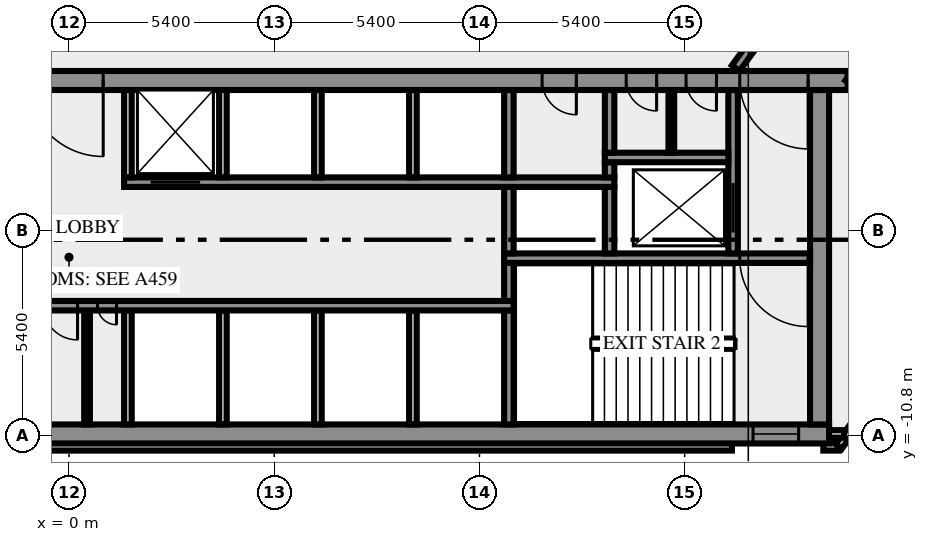
"""IFC4 building model, lengths in metres.
Left out: names, types, materials, properties, quantities, classifications, styles, units other than length and angle.
Written with IfcOpenShell. Run it as: python <this file> out.ifc"""

import sys

from ifc_helpers import new_model, si_unit, direction, frame, frame_2d, origin, place, context, subcontext, project, spatial, rectangle, extrude, element, fill, save


model = new_model("IFC4")
c1 = context("Model", 3, precision=1e-05, world=origin(), true_north=direction((0.0, 1.0)))
c2 = subcontext(c1, "Body", "Model", "MODEL_VIEW")
j1 = project(units=[si_unit("LENGTHUNIT", "METRE"), si_unit("PLANEANGLEUNIT", "RADIAN")], contexts=[c1])
p1 = place(None, origin())
s1 = spatial("IfcSite", under=j1, at=p1, CompositionType="ELEMENT")
p2 = place(p1, origin())
s2 = spatial("IfcBuilding", under=s1, at=p2, CompositionType="ELEMENT")
p3 = place(p2, frame((0.0, 0.0, 63.0)))
s3 = spatial("IfcBuildingStorey", under=s2, at=p3, CompositionType="ELEMENT", Elevation=63.0)
p4 = place(p3, frame((-17.444, -11.088, 0.0), z_axis=(0.0, 0.0, 1.0), x_axis=(1.0, 0.0, 0.0)))
e1 = element("IfcWall", 1, at=p4, inside=s3, PredefinedType="SOLIDWALL", context=c2, shape_type="SweptSolid", body=[
    extrude(rectangle(XDim=34.888, YDim=0.2, at=frame_2d((17.444, 0.0))), origin(), (0.0, 0.0, 1.0), 3.65),
])
p5 = place(p3, frame((19.85, -11.088, 0.0), z_axis=(0.0, 0.0, 1.0), x_axis=(1.0, 0.0, 0.0)))
e2 = element("IfcWall", 2, at=p5, inside=s3, PredefinedType="SOLIDWALL", context=c2, shape_type="SweptSolid", body=[
    extrude(rectangle(XDim=0.406, YDim=0.2, at=frame_2d((0.203, 0.0))), origin(), (0.0, 0.0, 1.0), 3.65),
])
p6 = place(p3, frame((20.253, -11.083, 0.0), z_axis=(0.0, 0.0, 1.0), x_axis=(0.587766567315, 0.809030569476, 0.0)))
e3 = element("IfcWall", 3, at=p6, inside=s3, PredefinedType="SOLIDWALL", context=c2, shape_type="SweptSolid", body=[
    extrude(rectangle(XDim=2.688, YDim=0.2, at=frame_2d((1.344, 0.0))), origin(), (0.0, 0.0, 1.0), 3.65),
])
p7 = place(p3, frame((19.98, -10.75, 0.0), z_axis=(0.0, 0.0, 1.0), x_axis=(1.0, 0.0, 0.0)))
e4 = element("IfcWall", 4, at=p7, inside=s3, PredefinedType="SOLIDWALL", context=c2, shape_type="SweptSolid", body=[
    extrude(rectangle(XDim=0.417, YDim=0.2, at=frame_2d((0.208, 0.0))), origin(), (0.0, 0.0, 1.0), 3.65),
])
p8 = place(p3, frame((-20.0, -10.75, 0.0), z_axis=(0.0, 0.0, 1.0), x_axis=(1.0, 0.0, 0.0)))
e5 = element("IfcWall", 5, at=p8, inside=s3, PredefinedType="SHEAR", context=c2, shape_type="SweptSolid", body=[
    extrude(rectangle(XDim=40.0, YDim=0.5, at=frame_2d((20.0, 0.0))), origin(), (0.0, 0.0, 1.0), 3.65),
])
p9 = place(p8, frame((0.8, 0.0, 1.0)))
e6 = element("IfcOpeningElement", 6, at=p9, cuts=e5, PredefinedType="OPENING", context=c2, shape_type="SweptSolid", body=[
    extrude(rectangle(XDim=1.2, YDim=1.2, at=frame_2d((0.6, 0.6))), frame((0.0, 0.26, 0.0), z_axis=(0.0, -1.0, 0.0), x_axis=(1.0, 0.0, 0.0)), (0.0, 0.0, 1.0), 0.52),
])
p10 = place(p8, frame((38.0, 0.0, 1.0)))
e7 = element("IfcOpeningElement", 7, at=p10, cuts=e5, PredefinedType="OPENING", context=c2, shape_type="SweptSolid", body=[
    extrude(rectangle(XDim=1.2, YDim=1.2, at=frame_2d((0.6, 0.6))), frame((0.0, 0.26, 0.0), z_axis=(0.0, -1.0, 0.0), x_axis=(1.0, 0.0, 0.0)), (0.0, 0.0, 1.0), 0.52),
])
p11 = place(p3, frame((0.475, -10.5, 0.0), z_axis=(0.0, 0.0, 1.0), x_axis=(0.0, 1.0, 0.0)))
e8 = element("IfcWall", 8, at=p11, inside=s3, PredefinedType="PARTITIONING", context=c2, shape_type="SweptSolid", body=[
    extrude(rectangle(XDim=3.0, YDim=0.15, at=frame_2d((1.5, 0.0))), origin(), (0.0, 0.0, 1.0), 3.65),
])
for number, where, z_axis, x_axis in (
    (9, (1.55, -10.5, 0.0), (0.0, 0.0, 1.0), (0.0, 1.0, 0.0)),
    (10, (4.05, -10.5, 0.0), (0.0, 0.0, 1.0), (0.0, 1.0, 0.0)),
    (11, (6.55, -10.5, 0.0), (0.0, 0.0, 1.0), (0.0, 1.0, 0.0)),
    (12, (9.05, -10.5, 0.0), (0.0, 0.0, 1.0), (0.0, 1.0, 0.0)),
):
    element("IfcWall", number, at=place(p3, frame(where, z_axis=z_axis, x_axis=x_axis)), inside=s3, PredefinedType="SOLIDWALL", context=c2, shape_type="SweptSolid", body=[
        extrude(rectangle(XDim=3.0, YDim=0.2, at=frame_2d((1.5, 0.0))), origin(), (0.0, 0.0, 1.0), 3.65),
    ])
p12 = place(p3, frame((11.575, -10.5, 0.0), z_axis=(0.0, 0.0, 1.0), x_axis=(0.0, 1.0, 0.0)))
e13 = element("IfcWall", 13, at=p12, inside=s3, PredefinedType="SHEAR", context=c2, shape_type="SweptSolid", body=[
    extrude(rectangle(XDim=3.0, YDim=0.25, at=frame_2d((1.5, 0.0))), origin(), (0.0, 0.0, 1.0), 3.65),
])
p13 = place(p3, frame((19.75, -10.5, 0.0), z_axis=(0.0, 0.0, 1.0), x_axis=(0.0, 1.0, 0.0)))
e14 = element("IfcWall", 14, at=p13, inside=s3, PredefinedType="SHEAR", context=c2, shape_type="SweptSolid", body=[
    extrude(rectangle(XDim=8.8, YDim=0.5, at=frame_2d((4.4, 0.0))), origin(), (0.0, 0.0, 1.0), 3.65),
])
p14 = place(p3, frame((11.7, -7.375, 0.0), z_axis=(0.0, 0.0, 1.0), x_axis=(-1.0, 0.0, 0.0)))
e15 = element("IfcWall", 15, at=p14, inside=s3, PredefinedType="SHEAR", context=c2, shape_type="SweptSolid", body=[
    extrude(rectangle(XDim=23.4, YDim=0.25, at=frame_2d((11.7, 0.0))), origin(), (0.0, 0.0, 1.0), 3.65),
])
p15 = place(p14, frame((21.45, 0.0, 0.0)))
e16 = element("IfcOpeningElement", 16, at=p15, cuts=e15, PredefinedType="OPENING", context=c2, shape_type="SweptSolid", body=[
    extrude(rectangle(XDim=1.1, YDim=2.1, at=frame_2d((0.55, 1.05))), frame((0.0, 0.135, 0.0), z_axis=(0.0, -1.0, 0.0), x_axis=(1.0, 0.0, 0.0)), (0.0, 0.0, 1.0), 0.27),
])
p16 = place(p14, frame((18.95, 0.0, 0.0)))
e17 = element("IfcOpeningElement", 17, at=p16, cuts=e15, PredefinedType="OPENING", context=c2, shape_type="SweptSolid", body=[
    extrude(rectangle(XDim=1.1, YDim=2.1, at=frame_2d((0.55, 1.05))), frame((0.0, 0.135, 0.0), z_axis=(0.0, -1.0, 0.0), x_axis=(1.0, 0.0, 0.0)), (0.0, 0.0, 1.0), 0.27),
])
p17 = place(p14, frame((16.45, 0.0, 0.0)))
e18 = element("IfcOpeningElement", 18, at=p17, cuts=e15, PredefinedType="OPENING", context=c2, shape_type="SweptSolid", body=[
    extrude(rectangle(XDim=1.1, YDim=2.1, at=frame_2d((0.55, 1.05))), frame((0.0, 0.135, 0.0), z_axis=(0.0, -1.0, 0.0), x_axis=(1.0, 0.0, 0.0)), (0.0, 0.0, 1.0), 0.27),
])
p18 = place(p14, frame((14.5, 0.0, 0.0)))
e19 = element("IfcOpeningElement", 19, at=p18, cuts=e15, PredefinedType="OPENING", context=c2, shape_type="SweptSolid", body=[
    extrude(rectangle(XDim=0.9, YDim=2.1, at=frame_2d((0.45, 1.05))), frame((0.0, 0.135, 0.0), z_axis=(0.0, -1.0, 0.0), x_axis=(1.0, 0.0, 0.0)), (0.0, 0.0, 1.0), 0.27),
])
p19 = place(p14, frame((12.95, 0.0, 0.0)))
e20 = element("IfcOpeningElement", 20, at=p19, cuts=e15, PredefinedType="OPENING", context=c2, shape_type="SweptSolid", body=[
    extrude(rectangle(XDim=0.9, YDim=2.1, at=frame_2d((0.45, 1.05))), frame((0.0, 0.135, 0.0), z_axis=(0.0, -1.0, 0.0), x_axis=(1.0, 0.0, 0.0)), (0.0, 0.0, 1.0), 0.27),
])
p20 = place(p14, frame((11.475, 0.0, 0.0)))
e21 = element("IfcOpeningElement", 21, at=p20, cuts=e15, PredefinedType="OPENING", context=c2, shape_type="SweptSolid", body=[
    extrude(rectangle(XDim=0.9, YDim=2.1, at=frame_2d((0.45, 1.05))), frame((0.0, 0.135, 0.0), z_axis=(0.0, -1.0, 0.0), x_axis=(1.0, 0.0, 0.0)), (0.0, 0.0, 1.0), 0.27),
])
p21 = place(p14, frame((10.45, 0.0, 0.0)))
e22 = element("IfcOpeningElement", 22, at=p21, cuts=e15, PredefinedType="OPENING", context=c2, shape_type="SweptSolid", body=[
    extrude(rectangle(XDim=0.5, YDim=2.1, at=frame_2d((0.25, 1.05))), frame((0.0, 0.135, 0.0), z_axis=(0.0, -1.0, 0.0), x_axis=(1.0, 0.0, 0.0)), (0.0, 0.0, 1.0), 0.27),
])
p22 = place(p3, frame((11.575, -7.25, 0.0), z_axis=(0.0, 0.0, 1.0), x_axis=(0.0, 1.0, 0.0)))
e23 = element("IfcWall", 23, at=p22, inside=s3, PredefinedType="SHEAR", context=c2, shape_type="SweptSolid", body=[
    extrude(rectangle(XDim=1.0, YDim=0.25, at=frame_2d((0.5, 0.0))), origin(), (0.0, 0.0, 1.0), 3.65),
])
p23 = place(p3, frame((19.5, -6.125, 0.0), z_axis=(0.0, 0.0, 1.0), x_axis=(-1.0, 0.0, 0.0)))
e24 = element("IfcWall", 24, at=p23, inside=s3, PredefinedType="SHEAR", context=c2, shape_type="SweptSolid", body=[
    extrude(rectangle(XDim=8.05, YDim=0.25, at=frame_2d((4.025, 0.0))), origin(), (0.0, 0.0, 1.0), 3.65),
])
p24 = place(p23, frame((0.05, 0.0, 0.0)))
e25 = element("IfcOpeningElement", 25, at=p24, cuts=e24, PredefinedType="OPENING", context=c2, shape_type="SweptSolid", body=[
    extrude(rectangle(XDim=1.8, YDim=2.1, at=frame_2d((0.9, 1.05))), frame((0.0, 0.135, 0.0), z_axis=(0.0, -1.0, 0.0), x_axis=(1.0, 0.0, 0.0)), (0.0, 0.0, 1.0), 0.27),
])
for number, where, z_axis, x_axis in (
    (26, (11.575, -6.0, 0.0), (0.0, 0.0, 1.0), (0.0, 1.0, 0.0)),
    (27, (14.225, -6.0, 0.0), (0.0, 0.0, 1.0), (0.0, 1.0, 0.0)),
):
    element("IfcWall", number, at=place(p3, frame(where, z_axis=z_axis, x_axis=x_axis)), inside=s3, PredefinedType="SHEAR", context=c2, shape_type="SweptSolid", body=[
        extrude(rectangle(XDim=1.75, YDim=0.25, at=frame_2d((0.875, 0.0))), origin(), (0.0, 0.0, 1.0), 3.65),
    ])
p25 = place(p3, frame((17.475, -6.0, 0.0), z_axis=(0.0, 0.0, 1.0), x_axis=(0.0, 1.0, 0.0)))
e28 = element("IfcWall", 28, at=p25, inside=s3, PredefinedType="SHEAR", context=c2, shape_type="SweptSolid", body=[
    extrude(rectangle(XDim=4.3, YDim=0.25, at=frame_2d((2.15, 0.0))), origin(), (0.0, 0.0, 1.0), 3.65),
])
p26 = place(p25, frame((0.55, 0.0, 0.0)))
e29 = element("IfcOpeningElement", 29, at=p26, cuts=e28, PredefinedType="OPENING", context=c2, shape_type="SweptSolid", body=[
    extrude(rectangle(XDim=1.3, YDim=2.1, at=frame_2d((0.65, 1.05))), frame((0.0, 0.135, 0.0), z_axis=(0.0, -1.0, 0.0), x_axis=(1.0, 0.0, 0.0)), (0.0, 0.0, 1.0), 0.27),
])
p27 = place(p3, frame((1.45, -4.125, 0.0), z_axis=(0.0, 0.0, 1.0), x_axis=(1.0, 0.0, 0.0)))
e30 = element("IfcWall", 30, at=p27, inside=s3, PredefinedType="SHEAR", context=c2, shape_type="SweptSolid", body=[
    extrude(rectangle(XDim=12.9, YDim=0.25, at=frame_2d((6.45, 0.0))), origin(), (0.0, 0.0, 1.0), 3.65),
])
p28 = place(p27, frame((0.7, 0.0, 0.0)))
e31 = element("IfcOpeningElement", 31, at=p28, cuts=e30, PredefinedType="OPENING", context=c2, shape_type="SweptSolid", body=[
    extrude(rectangle(XDim=1.3, YDim=2.1, at=frame_2d((0.65, 1.05))), frame((0.0, 0.135, 0.0), z_axis=(0.0, -1.0, 0.0), x_axis=(1.0, 0.0, 0.0)), (0.0, 0.0, 1.0), 0.27),
])
for number, where, z_axis, x_axis in (
    (32, (1.55, -4.0, 0.0), (0.0, 0.0, 1.0), (0.0, 1.0, 0.0)),
    (33, (4.05, -4.0, 0.0), (0.0, 0.0, 1.0), (0.0, 1.0, 0.0)),
    (34, (6.55, -4.0, 0.0), (0.0, 0.0, 1.0), (0.0, 1.0, 0.0)),
    (35, (9.05, -4.0, 0.0), (0.0, 0.0, 1.0), (0.0, 1.0, 0.0)),
):
    element("IfcWall", number, at=place(p3, frame(where, z_axis=z_axis, x_axis=x_axis)), inside=s3, PredefinedType="SOLIDWALL", context=c2, shape_type="SweptSolid", body=[
        extrude(rectangle(XDim=2.3, YDim=0.2, at=frame_2d((1.15, 0.0))), origin(), (0.0, 0.0, 1.0), 3.65),
    ])
p29 = place(p3, frame((11.575, -4.0, 0.0), z_axis=(0.0, 0.0, 1.0), x_axis=(0.0, 1.0, 0.0)))
e36 = element("IfcWall", 36, at=p29, inside=s3, PredefinedType="SHEAR", context=c2, shape_type="SweptSolid", body=[
    extrude(rectangle(XDim=2.3, YDim=0.25, at=frame_2d((1.15, 0.0))), origin(), (0.0, 0.0, 1.0), 3.65),
])
p30 = place(p3, frame((14.225, -4.0, 0.0), z_axis=(0.0, 0.0, 1.0), x_axis=(0.0, 1.0, 0.0)))
e37 = element("IfcWall", 37, at=p30, inside=s3, PredefinedType="SHEAR", context=c2, shape_type="SweptSolid", body=[
    extrude(rectangle(XDim=0.4, YDim=0.25, at=frame_2d((0.2, 0.0))), origin(), (0.0, 0.0, 1.0), 3.65),
])
p31 = place(p3, frame((14.1, -3.475, 0.0), z_axis=(0.0, 0.0, 1.0), x_axis=(1.0, 0.0, 0.0)))
e38 = element("IfcWall", 38, at=p31, inside=s3, PredefinedType="SHEAR", context=c2, shape_type="SweptSolid", body=[
    extrude(rectangle(XDim=3.25, YDim=0.25, at=frame_2d((1.625, 0.0))), origin(), (0.0, 0.0, 1.0), 3.65),
])
p32 = place(p3, frame((14.225, -3.35, 0.0), z_axis=(0.0, 0.0, 1.0), x_axis=(0.0, 1.0, 0.0)))
e39 = element("IfcWall", 39, at=p32, inside=s3, PredefinedType="SHEAR", context=c2, shape_type="SweptSolid", body=[
    extrude(rectangle(XDim=1.65, YDim=0.25, at=frame_2d((0.825, 0.0))), origin(), (0.0, 0.0, 1.0), 3.65),
])
p33 = place(p3, frame((15.85, -3.35, 0.0), z_axis=(0.0, 0.0, 1.0), x_axis=(0.0, 1.0, 0.0)))
e40 = element("IfcWall", 40, at=p33, inside=s3, PredefinedType="PARTITIONING", context=c2, shape_type="SweptSolid", body=[
    extrude(rectangle(XDim=1.65, YDim=0.15, at=frame_2d((0.825, 0.0))), origin(), (0.0, 0.0, 1.0), 3.65),
])
p34 = place(p3, frame((20.49, -1.45, 0.0), z_axis=(0.0, 0.0, 1.0), x_axis=(-1.0, 0.0, 0.0)))
e41 = element("IfcWall", 41, at=p34, inside=s3, PredefinedType="SHEAR", context=c2, shape_type="SweptSolid", body=[
    extrude(rectangle(XDim=40.98, YDim=0.5, at=frame_2d((20.49, 0.0))), origin(), (0.0, 0.0, 1.0), 3.65),
])
p35 = place(p34, frame((38.14, 0.0, 0.0)))
e42 = element("IfcOpeningElement", 42, at=p35, cuts=e41, PredefinedType="OPENING", context=c2, shape_type="SweptSolid", body=[
    extrude(rectangle(XDim=1.8, YDim=2.1, at=frame_2d((0.9, 1.05))), frame((0.0, 0.26, 0.0), z_axis=(0.0, -1.0, 0.0), x_axis=(1.0, 0.0, 0.0)), (0.0, 0.0, 1.0), 0.52),
])
p36 = place(p34, frame((35.89, 0.0, 0.0)))
e43 = element("IfcOpeningElement", 43, at=p36, cuts=e41, PredefinedType="OPENING", context=c2, shape_type="SweptSolid", body=[
    extrude(rectangle(XDim=0.9, YDim=2.1, at=frame_2d((0.45, 1.05))), frame((0.0, 0.26, 0.0), z_axis=(0.0, -1.0, 0.0), x_axis=(1.0, 0.0, 0.0)), (0.0, 0.0, 1.0), 0.52),
])
p37 = place(p34, frame((32.94, 0.0, 0.0)))
e44 = element("IfcOpeningElement", 44, at=p37, cuts=e41, PredefinedType="OPENING", context=c2, shape_type="SweptSolid", body=[
    extrude(rectangle(XDim=0.9, YDim=2.1, at=frame_2d((0.45, 1.05))), frame((0.0, 0.26, 0.0), z_axis=(0.0, -1.0, 0.0), x_axis=(1.0, 0.0, 0.0)), (0.0, 0.0, 1.0), 0.52),
])
p38 = place(p34, frame((19.59, 0.0, 0.0)))
e45 = element("IfcOpeningElement", 45, at=p38, cuts=e41, PredefinedType="OPENING", context=c2, shape_type="SweptSolid", body=[
    extrude(rectangle(XDim=2.0, YDim=2.1, at=frame_2d((1.0, 1.05))), frame((0.0, 0.26, 0.0), z_axis=(0.0, -1.0, 0.0), x_axis=(1.0, 0.0, 0.0)), (0.0, 0.0, 1.0), 0.52),
])
p39 = place(p34, frame((7.14, 0.0, 0.0)))
e46 = element("IfcOpeningElement", 46, at=p39, cuts=e41, PredefinedType="OPENING", context=c2, shape_type="SweptSolid", body=[
    extrude(rectangle(XDim=0.9, YDim=2.1, at=frame_2d((0.45, 1.05))), frame((0.0, 0.26, 0.0), z_axis=(0.0, -1.0, 0.0), x_axis=(1.0, 0.0, 0.0)), (0.0, 0.0, 1.0), 0.52),
])
p40 = place(p34, frame((5.028, 0.0, 0.0)))
e47 = element("IfcOpeningElement", 47, at=p40, cuts=e41, PredefinedType="OPENING", context=c2, shape_type="SweptSolid", body=[
    extrude(rectangle(XDim=0.8, YDim=2.1, at=frame_2d((0.4, 1.05))), frame((0.0, 0.26, 0.0), z_axis=(0.0, -1.0, 0.0), x_axis=(1.0, 0.0, 0.0)), (0.0, 0.0, 1.0), 0.52),
])
p41 = place(p34, frame((3.452, 0.0, 0.0)))
e48 = element("IfcOpeningElement", 48, at=p41, cuts=e41, PredefinedType="OPENING", context=c2, shape_type="SweptSolid", body=[
    extrude(rectangle(XDim=0.8, YDim=2.1, at=frame_2d((0.4, 1.05))), frame((0.0, 0.26, 0.0), z_axis=(0.0, -1.0, 0.0), x_axis=(1.0, 0.0, 0.0)), (0.0, 0.0, 1.0), 0.52),
])
p42 = place(p34, frame((1.04, 0.0, 0.0)))
e49 = element("IfcOpeningElement", 49, at=p42, cuts=e41, PredefinedType="OPENING", context=c2, shape_type="SweptSolid", body=[
    extrude(rectangle(XDim=1.8, YDim=2.1, at=frame_2d((0.9, 1.05))), frame((0.0, 0.26, 0.0), z_axis=(0.0, -1.0, 0.0), x_axis=(1.0, 0.0, 0.0)), (0.0, 0.0, 1.0), 0.52),
])
p43 = place(p3, frame((17.545, -1.125, 0.0), z_axis=(0.0, 0.0, 1.0), x_axis=(0.587786323093, 0.809016216391, 0.0)))
e50 = element("IfcWall", 50, at=p43, inside=s3, PredefinedType="SOLIDWALL", context=c2, shape_type="SweptSolid", body=[
    extrude(rectangle(XDim=33.493, YDim=0.25, at=frame_2d((16.747, 0.0))), origin(), (0.0, 0.0, 1.0), 3.65),
])
p44 = place(p43, frame((31.403, 0.0, 0.0)))
e51 = element("IfcOpeningElement", 51, at=p44, cuts=e50, PredefinedType="OPENING", context=c2, shape_type="SweptSolid", body=[
    extrude(rectangle(XDim=1.8, YDim=2.1, at=frame_2d((0.9, 1.05))), frame((0.0, 0.135, 0.0), z_axis=(0.0, -1.0, 0.0), x_axis=(1.0, 0.0, 0.0)), (0.0, 0.0, 1.0), 0.27),
])
p45 = place(p43, frame((3.392, 0.0, 0.0)))
e52 = element("IfcOpeningElement", 52, at=p45, cuts=e50, PredefinedType="OPENING", context=c2, shape_type="SweptSolid", body=[
    extrude(rectangle(XDim=1.8, YDim=2.1, at=frame_2d((0.9, 1.05))), frame((0.0, 0.135, 0.0), z_axis=(0.0, -1.0, 0.0), x_axis=(1.0, 0.0, 0.0)), (0.0, 0.0, 1.0), 0.27),
])
p46 = place(p3, frame((43.467, 30.045, 0.0), z_axis=(0.0, 0.0, 1.0), x_axis=(-0.587784726077, -0.809017376692, 0.0)))
e53 = element("IfcWall", 53, at=p46, inside=s3, PredefinedType="SOLIDWALL", context=c2, shape_type="SweptSolid", body=[
    extrude(rectangle(XDim=39.02, YDim=0.25, at=frame_2d((19.51, 0.0))), origin(), (0.0, 0.0, 1.0), 3.65),
])
p47 = place(p46, frame((11.404, 0.0, 0.0)))
e54 = element("IfcOpeningElement", 54, at=p47, cuts=e53, PredefinedType="OPENING", context=c2, shape_type="SweptSolid", body=[
    extrude(rectangle(XDim=0.9, YDim=2.1, at=frame_2d((0.45, 1.05))), frame((0.0, 0.135, 0.0), z_axis=(0.0, -1.0, 0.0), x_axis=(1.0, 0.0, 0.0)), (0.0, 0.0, 1.0), 0.27),
])
p48 = place(p46, frame((13.004, 0.0, 0.0)))
e55 = element("IfcOpeningElement", 55, at=p48, cuts=e53, PredefinedType="OPENING", context=c2, shape_type="SweptSolid", body=[
    extrude(rectangle(XDim=1.0, YDim=2.1, at=frame_2d((0.5, 1.05))), frame((0.0, 0.135, 0.0), z_axis=(0.0, -1.0, 0.0), x_axis=(1.0, 0.0, 0.0)), (0.0, 0.0, 1.0), 0.27),
])
p49 = place(p46, frame((37.287, 0.0, 0.0)))
e56 = element("IfcOpeningElement", 56, at=p49, cuts=e53, PredefinedType="OPENING", context=c2, shape_type="SweptSolid", body=[
    extrude(rectangle(XDim=1.2, YDim=2.1, at=frame_2d((0.6, 1.05))), frame((0.0, 0.135, 0.0), z_axis=(0.0, -1.0, 0.0), x_axis=(1.0, 0.0, 0.0)), (0.0, 0.0, 1.0), 0.27),
])
p50 = place(p46, frame((0.224, 0.0, 0.0)))
e57 = element("IfcOpeningElement", 57, at=p50, cuts=e53, PredefinedType="OPENING", context=c2, shape_type="SweptSolid", body=[
    extrude(rectangle(XDim=0.9, YDim=2.1, at=frame_2d((0.45, 1.05))), frame((0.0, 0.135, 0.0), z_axis=(0.0, -1.0, 0.0), x_axis=(1.0, 0.0, 0.0)), (0.0, 0.0, 1.0), 0.27),
])
p51 = place(p10, origin())
e58 = element("IfcWindow", 58, at=p51, inside=s3, PartitioningType="SINGLE_PANEL", PredefinedType="WINDOW", context=c2, shape_type="SweptSolid", body=[
    extrude(rectangle(XDim=1.2, YDim=1.2, at=frame_2d((0.6, 0.6))), frame((0.0, 0.03, 0.0), z_axis=(0.0, -1.0, 0.0), x_axis=(1.0, 0.0, 0.0)), (0.0, 0.0, 1.0), 0.06),
])
fill(e7, e58)
p52 = place(p20, origin())
e59 = element("IfcDoor", 59, at=p52, inside=s3, OperationType="SINGLE_SWING_RIGHT", PredefinedType="DOOR", context=c2, shape_type="SweptSolid", body=[
    extrude(rectangle(XDim=0.9, YDim=2.1, at=frame_2d((0.45, 1.05))), frame((0.0, 0.025, 0.0), z_axis=(0.0, -1.0, 0.0), x_axis=(1.0, 0.0, 0.0)), (0.0, 0.0, 1.0), 0.05),
])
fill(e21, e59)
p53 = place(p21, origin())
e60 = element("IfcDoor", 60, at=p53, inside=s3, OperationType="SINGLE_SWING_LEFT", PredefinedType="DOOR", context=c2, shape_type="SweptSolid", body=[
    extrude(rectangle(XDim=0.5, YDim=2.1, at=frame_2d((0.25, 1.05))), frame((0.0, 0.025, 0.0), z_axis=(0.0, -1.0, 0.0), x_axis=(1.0, 0.0, 0.0)), (0.0, 0.0, 1.0), 0.05),
])
fill(e22, e60)
p54 = place(p24, origin())
e61 = element("IfcDoor", 61, at=p54, inside=s3, OperationType="DOUBLE_DOOR_SINGLE_SWING", PredefinedType="DOOR", context=c2, shape_type="SweptSolid", body=[
    extrude(rectangle(XDim=1.8, YDim=2.1, at=frame_2d((0.9, 1.05))), frame((0.0, 0.025, 0.0), z_axis=(0.0, -1.0, 0.0), x_axis=(1.0, 0.0, 0.0)), (0.0, 0.0, 1.0), 0.05),
])
fill(e25, e61)
p55 = place(p26, origin())
e62 = element("IfcDoor", 62, at=p55, inside=s3, OperationType="DOUBLE_DOOR_SLIDING", PredefinedType="DOOR", context=c2, shape_type="SweptSolid", body=[
    extrude(rectangle(XDim=1.3, YDim=2.1, at=frame_2d((0.65, 1.05))), frame((0.0, 0.025, 0.0), z_axis=(0.0, -1.0, 0.0), x_axis=(1.0, 0.0, 0.0)), (0.0, 0.0, 1.0), 0.05),
])
fill(e29, e62)
p56 = place(p28, origin())
e63 = element("IfcDoor", 63, at=p56, inside=s3, OperationType="DOUBLE_DOOR_SLIDING", PredefinedType="DOOR", context=c2, shape_type="SweptSolid", body=[
    extrude(rectangle(XDim=1.3, YDim=2.1, at=frame_2d((0.65, 1.05))), frame((0.0, 0.025, 0.0), z_axis=(0.0, -1.0, 0.0), x_axis=(1.0, 0.0, 0.0)), (0.0, 0.0, 1.0), 0.05),
])
fill(e31, e63)
p57 = place(p38, origin())
e64 = element("IfcDoor", 64, at=p57, inside=s3, OperationType="DOUBLE_DOOR_SINGLE_SWING", PredefinedType="DOOR", context=c2, shape_type="SweptSolid", body=[
    extrude(rectangle(XDim=2.0, YDim=2.1, at=frame_2d((1.0, 1.05))), frame((0.0, 0.025, 0.0), z_axis=(0.0, -1.0, 0.0), x_axis=(1.0, 0.0, 0.0)), (0.0, 0.0, 1.0), 0.05),
])
fill(e45, e64)
p58 = place(p39, origin())
e65 = element("IfcDoor", 65, at=p58, inside=s3, OperationType="SINGLE_SWING_LEFT", PredefinedType="DOOR", context=c2, shape_type="SweptSolid", body=[
    extrude(rectangle(XDim=0.9, YDim=2.1, at=frame_2d((0.45, 1.05))), frame((0.0, 0.025, 0.0), z_axis=(0.0, -1.0, 0.0), x_axis=(1.0, 0.0, 0.0)), (0.0, 0.0, 1.0), 0.05),
])
fill(e46, e65)
p59 = place(p40, origin())
e66 = element("IfcDoor", 66, at=p59, inside=s3, OperationType="SINGLE_SWING_LEFT", PredefinedType="DOOR", context=c2, shape_type="SweptSolid", body=[
    extrude(rectangle(XDim=0.8, YDim=2.1, at=frame_2d((0.4, 1.05))), frame((0.0, 0.025, 0.0), z_axis=(0.0, -1.0, 0.0), x_axis=(1.0, 0.0, 0.0)), (0.0, 0.0, 1.0), 0.05),
])
fill(e47, e66)
p60 = place(p41, origin())
e67 = element("IfcDoor", 67, at=p60, inside=s3, OperationType="SINGLE_SWING_LEFT", PredefinedType="DOOR", context=c2, shape_type="SweptSolid", body=[
    extrude(rectangle(XDim=0.8, YDim=2.1, at=frame_2d((0.4, 1.05))), frame((0.0, 0.025, 0.0), z_axis=(0.0, -1.0, 0.0), x_axis=(1.0, 0.0, 0.0)), (0.0, 0.0, 1.0), 0.05),
])
fill(e48, e67)
p61 = place(p42, origin())
e68 = element("IfcDoor", 68, at=p61, inside=s3, OperationType="DOUBLE_DOOR_SINGLE_SWING", PredefinedType="DOOR", context=c2, shape_type="SweptSolid", body=[
    extrude(rectangle(XDim=1.8, YDim=2.1, at=frame_2d((0.9, 1.05))), frame((0.0, 0.025, 0.0), z_axis=(0.0, -1.0, 0.0), x_axis=(1.0, 0.0, 0.0)), (0.0, 0.0, 1.0), 0.05),
])
fill(e49, e68)
save(model, sys.argv[1])
